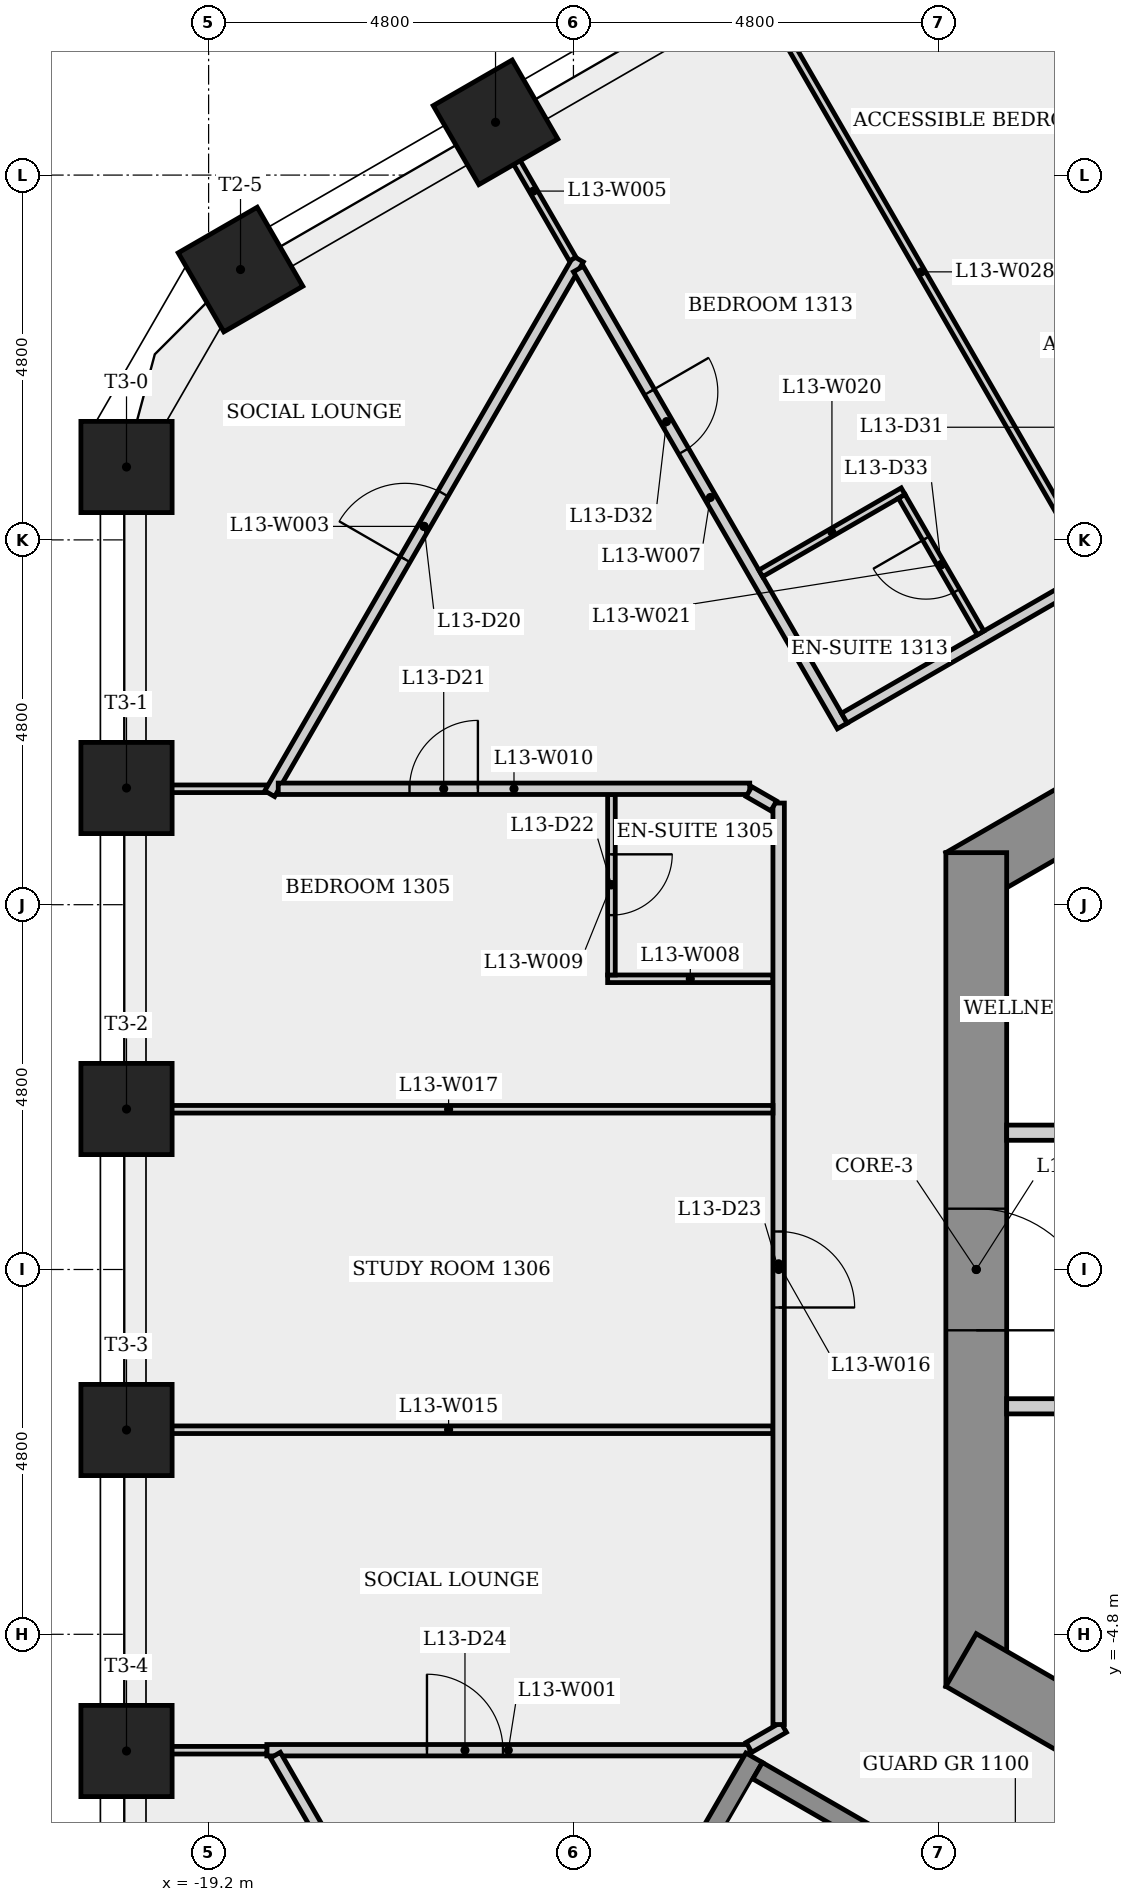
"""IFC4 building model, lengths in metres.
Left out: names, types, materials, properties, quantities, classifications, styles, units other than length and angle.
Written with IfcOpenShell. Run it as: python <this file> out.ifc"""

import sys

from ifc_helpers import new_model, si_unit, direction, frame, frame_2d, origin, origin_2d, place, context, subcontext, project, spatial, rectangle, extrude, element, fill, save


model = new_model("IFC4")
c1 = context("Model", 3, precision=1e-05, world=origin(), true_north=direction((0.0, 1.0)))
c2 = subcontext(c1, "Body", "Model", "MODEL_VIEW")
j1 = project(units=[si_unit("LENGTHUNIT", "METRE"), si_unit("PLANEANGLEUNIT", "RADIAN")], contexts=[c1])
p1 = place(None, origin())
s1 = spatial("IfcSite", under=j1, at=p1, CompositionType="ELEMENT")
p2 = place(p1, origin())
s2 = spatial("IfcBuilding", under=s1, at=p2, CompositionType="ELEMENT")
p3 = place(p2, frame((0.0, 0.0, 52.7)))
s3 = spatial("IfcBuildingStorey", under=s2, at=p3, CompositionType="ELEMENT", Elevation=52.7)
p4 = place(p3, frame((0.2, 10.623, 0.0), z_axis=(0.0, 0.0, 1.0), x_axis=(-0.866023993627, -0.500002442456, 0.0)))
e1 = element("IfcWall", 1, at=p4, inside=s3, PredefinedType="SHEAR", context=c2, shape_type="SweptSolid", body=[
    extrude(rectangle(XDim=10.97, YDim=0.8, at=frame_2d((5.485, 0.0))), origin(), (0.0, 0.0, 1.0), 3.4),
])
p5 = place(p4, frame((7.944, 0.0, 0.0)))
e2 = element("IfcOpeningElement", 2, at=p5, cuts=e1, PredefinedType="OPENING", context=c2, shape_type="SweptSolid", body=[
    extrude(rectangle(XDim=0.9, YDim=2.1, at=frame_2d((0.45, 1.05))), frame((0.0, 0.41, 0.0), z_axis=(0.0, -1.0, 0.0), x_axis=(1.0, 0.0, 0.0)), (0.0, 0.0, 1.0), 0.82),
])
p6 = place(p4, frame((1.86, 0.0, 0.0)))
e3 = element("IfcOpeningElement", 3, at=p6, cuts=e1, PredefinedType="OPENING", context=c2, shape_type="SweptSolid", body=[
    extrude(rectangle(XDim=0.9, YDim=2.1, at=frame_2d((0.45, 1.05))), frame((0.0, 0.41, 0.0), z_axis=(0.0, -1.0, 0.0), x_axis=(1.0, 0.0, 0.0)), (0.0, 0.0, 1.0), 0.82),
])
p7 = place(p3, frame((-9.1, 5.485, 0.0), z_axis=(0.0, 0.0, 1.0), x_axis=(0.0, -1.0, 0.0)))
e4 = element("IfcWall", 4, at=p7, inside=s3, PredefinedType="SHEAR", context=c2, shape_type="SweptSolid", body=[
    extrude(rectangle(XDim=10.97, YDim=0.8, at=frame_2d((5.485, 0.0))), origin(), (0.0, 0.0, 1.0), 3.4),
])
p8 = place(p7, frame((4.685, 0.0, 0.0)))
e5 = element("IfcOpeningElement", 5, at=p8, cuts=e4, PredefinedType="OPENING", context=c2, shape_type="SweptSolid", body=[
    extrude(rectangle(XDim=1.6, YDim=2.1, at=frame_2d((0.8, 1.05))), frame((0.0, 0.41, 0.0), z_axis=(0.0, -1.0, 0.0), x_axis=(1.0, 0.0, 0.0)), (0.0, 0.0, 1.0), 0.82),
])
p9 = place(p3, frame((-9.3, -5.138, 0.0), z_axis=(0.0, 0.0, 1.0), x_axis=(0.866023993627, -0.500002442456, 0.0)))
e6 = element("IfcWall", 6, at=p9, inside=s3, PredefinedType="SHEAR", context=c2, shape_type="SweptSolid", body=[
    extrude(rectangle(XDim=10.97, YDim=0.8, at=frame_2d((5.485, 0.0))), origin(), (0.0, 0.0, 1.0), 3.4),
])
p10 = place(p9, frame((5.74, 0.0, 0.0)))
e7 = element("IfcOpeningElement", 7, at=p10, cuts=e6, PredefinedType="OPENING", context=c2, shape_type="SweptSolid", body=[
    extrude(rectangle(XDim=0.9, YDim=2.1, at=frame_2d((0.45, 1.05))), frame((0.0, 0.41, 0.0), z_axis=(0.0, -1.0, 0.0), x_axis=(1.0, 0.0, 0.0)), (0.0, 0.0, 1.0), 0.82),
])
for number, where, z_axis, x_axis in (
    (8, (-15.425, 15.094, 0.0), (0.0, 0.0, 1.0), (-0.5, 0.866, 0.0)),
    (9, (-18.78, 13.157, 0.0), (0.0, 0.0, 1.0), (-0.5, 0.866, 0.0)),
    (10, (-20.28, 10.559, 0.0), (0.0, 0.0, 1.0), (-1.0, 0.0, 0.0)),
    (11, (-20.28, 6.335, 0.0), (0.0, 0.0, 1.0), (-1.0, 0.0, 0.0)),
    (12, (-20.28, 2.112, 0.0), (0.0, 0.0, 1.0), (-1.0, 0.0, 0.0)),
    (13, (-20.28, -2.112, 0.0), (0.0, 0.0, 1.0), (-1.0, 0.0, 0.0)),
    (14, (-20.28, -6.335, 0.0), (0.0, 0.0, 1.0), (-1.0, 0.0, 0.0)),
):
    element("IfcColumn", number, at=place(p3, frame(where, z_axis=z_axis, x_axis=x_axis)), inside=s3, PredefinedType="COLUMN", context=c2, shape_type="SweptSolid", body=[
        extrude(rectangle(XDim=1.2, YDim=1.2, at=origin_2d()), origin(), (0.0, 0.0, 1.0), 3.4),
    ])
p11 = place(p3, frame((-18.434, -6.325, 0.0), z_axis=(0.0, 0.0, 1.0), x_axis=(1.0, 0.0, 0.0)))
e15 = element("IfcWall", 15, at=p11, inside=s3, PredefinedType="PARTITIONING", context=c2, shape_type="SweptSolid", body=[
    extrude(rectangle(XDim=6.353, YDim=0.15, at=frame_2d((3.177, 0.0))), origin(), (0.0, 0.0, 1.0), 3.05),
])
p12 = place(p11, frame((2.107, 0.0, 0.0)))
e16 = element("IfcOpeningElement", 16, at=p12, cuts=e15, PredefinedType="OPENING", context=c2, shape_type="SweptSolid", body=[
    extrude(rectangle(XDim=1.0, YDim=2.1, at=frame_2d((0.5, 1.05))), frame((0.0, 0.085, 0.0), z_axis=(0.0, -1.0, 0.0), x_axis=(1.0, 0.0, 0.0)), (0.0, 0.0, 1.0), 0.17),
])
p13 = place(p3, frame((-18.434, 6.325, 0.0), z_axis=(0.0, 0.0, 1.0), x_axis=(-1.0, 0.0, 0.0)))
e17 = element("IfcWall", 17, at=p13, inside=s3, PredefinedType="PARTITIONING", context=c2, shape_type="SweptSolid", body=[
    extrude(rectangle(XDim=1.876, YDim=0.1, at=frame_2d((0.938, 0.0))), origin(), (0.0, 0.0, 1.0), 3.05),
])
p14 = place(p3, frame((-18.396, 6.26, 0.0), z_axis=(0.0, 0.0, 1.0), x_axis=(0.500005169787, 0.866022418986, 0.0)))
e18 = element("IfcWall", 18, at=p14, inside=s3, PredefinedType="PARTITIONING", context=c2, shape_type="SweptSolid", body=[
    extrude(rectangle(XDim=8.123, YDim=0.15, at=frame_2d((4.062, 0.0))), origin(), (0.0, 0.0, 1.0), 3.05),
])
p15 = place(p14, frame((3.561, 0.0, 0.0)))
e19 = element("IfcOpeningElement", 19, at=p15, cuts=e18, PredefinedType="OPENING", context=c2, shape_type="SweptSolid", body=[
    extrude(rectangle(XDim=1.0, YDim=2.1, at=frame_2d((0.5, 1.05))), frame((0.0, 0.085, 0.0), z_axis=(0.0, -1.0, 0.0), x_axis=(1.0, 0.0, 0.0)), (0.0, 0.0, 1.0), 0.17),
])
p16 = place(p3, frame((-18.434, -6.325, 0.0), z_axis=(0.0, 0.0, 1.0), x_axis=(-1.0, 0.0, 0.0)))
e20 = element("IfcWall", 20, at=p16, inside=s3, PredefinedType="PARTITIONING", context=c2, shape_type="SweptSolid", body=[
    extrude(rectangle(XDim=1.876, YDim=0.1, at=frame_2d((0.938, 0.0))), origin(), (0.0, 0.0, 1.0), 3.05),
])
p17 = place(p3, frame((-15.443, 15.084, 0.0), z_axis=(0.0, 0.0, 1.0), x_axis=(0.500015708345, -0.866016334377, 0.0)))
e21 = element("IfcWall", 21, at=p17, inside=s3, PredefinedType="PARTITIONING", context=c2, shape_type="SweptSolid", body=[
    extrude(rectangle(XDim=2.066, YDim=0.1, at=frame_2d((1.033, 0.0))), origin(), (0.0, 0.0, 1.0), 3.05),
])
p18 = place(p3, frame((-15.125, -11.927, 0.0), z_axis=(0.0, 0.0, 1.0), x_axis=(-0.499995720892, 0.866027874314, 0.0)))
e22 = element("IfcWall", 22, at=p18, inside=s3, PredefinedType="PARTITIONING", context=c2, shape_type="SweptSolid", body=[
    extrude(rectangle(XDim=6.393, YDim=0.15, at=frame_2d((3.197, 0.0))), origin(), (0.0, 0.0, 1.0), 3.05),
])
p19 = place(p18, frame((2.734, 0.0, 0.0)))
e23 = element("IfcOpeningElement", 23, at=p19, cuts=e22, PredefinedType="OPENING", context=c2, shape_type="SweptSolid", body=[
    extrude(rectangle(XDim=1.0, YDim=2.1, at=frame_2d((0.5, 1.05))), frame((0.0, 0.085, 0.0), z_axis=(0.0, -1.0, 0.0), x_axis=(1.0, 0.0, 0.0)), (0.0, 0.0, 1.0), 0.17),
])
p20 = place(p3, frame((-14.335, 13.165, 0.0), z_axis=(0.0, 0.0, 1.0), x_axis=(0.499981158809, -0.866036281478, 0.0)))
e24 = element("IfcWall", 24, at=p20, inside=s3, PredefinedType="PARTITIONING", context=c2, shape_type="SweptSolid", body=[
    extrude(rectangle(XDim=6.944, YDim=0.15, at=frame_2d((3.472, 0.0))), origin(), (0.0, 0.0, 1.0), 3.05),
])
p21 = place(p20, frame((1.869, 0.0, 0.0)))
e25 = element("IfcOpeningElement", 25, at=p21, cuts=e24, PredefinedType="OPENING", context=c2, shape_type="SweptSolid", body=[
    extrude(rectangle(XDim=0.9, YDim=2.1, at=frame_2d((0.45, 1.05))), frame((0.0, 0.085, 0.0), z_axis=(0.0, -1.0, 0.0), x_axis=(1.0, 0.0, 0.0)), (0.0, 0.0, 1.0), 0.17),
])
p22 = place(p3, frame((-13.95, 3.825, 0.0), z_axis=(0.0, 0.0, 1.0), x_axis=(1.0, 0.0, 0.0)))
e26 = element("IfcWall", 26, at=p22, inside=s3, PredefinedType="PARTITIONING", context=c2, shape_type="SweptSolid", body=[
    extrude(rectangle(XDim=2.175, YDim=0.1, at=frame_2d((1.087, 0.0))), origin(), (0.0, 0.0, 1.0), 3.05),
])
p23 = place(p3, frame((-13.9, 6.25, 0.0), z_axis=(0.0, 0.0, 1.0), x_axis=(0.0, -1.0, 0.0)))
e27 = element("IfcWall", 27, at=p23, inside=s3, PredefinedType="PARTITIONING", context=c2, shape_type="SweptSolid", body=[
    extrude(rectangle(XDim=2.375, YDim=0.1, at=frame_2d((1.188, 0.0))), origin(), (0.0, 0.0, 1.0), 3.05),
])
p24 = place(p23, frame((0.788, 0.0, 0.0)))
e28 = element("IfcOpeningElement", 28, at=p24, cuts=e27, PredefinedType="OPENING", context=c2, shape_type="SweptSolid", body=[
    extrude(rectangle(XDim=0.8, YDim=2.1, at=frame_2d((0.4, 1.05))), frame((0.0, 0.06, 0.0), z_axis=(0.0, -1.0, 0.0), x_axis=(1.0, 0.0, 0.0)), (0.0, 0.0, 1.0), 0.12),
])
p25 = place(p3, frame((-18.284, 6.325, 0.0), z_axis=(0.0, 0.0, 1.0), x_axis=(1.0, 0.0, 0.0)))
e29 = element("IfcWall", 29, at=p25, inside=s3, PredefinedType="PARTITIONING", context=c2, shape_type="SweptSolid", body=[
    extrude(rectangle(XDim=6.203, YDim=0.15, at=frame_2d((3.102, 0.0))), origin(), (0.0, 0.0, 1.0), 3.05),
])
p26 = place(p25, frame((1.727, 0.0, 0.0)))
e30 = element("IfcOpeningElement", 30, at=p26, cuts=e29, PredefinedType="OPENING", context=c2, shape_type="SweptSolid", body=[
    extrude(rectangle(XDim=0.9, YDim=2.1, at=frame_2d((0.45, 1.05))), frame((0.0, 0.085, 0.0), z_axis=(0.0, -1.0, 0.0), x_axis=(1.0, 0.0, 0.0)), (0.0, 0.0, 1.0), 0.17),
])
p27 = place(p3, frame((-13.648, -9.239, 0.0), z_axis=(0.0, 0.0, 1.0), x_axis=(0.500017246033, 0.866015446554, 0.0)))
e31 = element("IfcWall", 31, at=p27, inside=s3, PredefinedType="SHEAR", context=c2, shape_type="SweptSolid", body=[
    extrude(rectangle(XDim=3.25, YDim=0.25, at=frame_2d((1.625, 0.0))), origin(), (0.0, 0.0, 1.0), 3.05),
])
p28 = place(p3, frame((-12.091, -6.288, 0.0), z_axis=(0.0, 0.0, 1.0), x_axis=(0.866208757248, 0.499682287925, 0.0)))
e32 = element("IfcWall", 32, at=p28, inside=s3, PredefinedType="PARTITIONING", context=c2, shape_type="SweptSolid", body=[
    extrude(rectangle(XDim=0.526, YDim=0.15, at=frame_2d((0.263, 0.0))), origin(), (0.0, 0.0, 1.0), 3.05),
])
p29 = place(p3, frame((-11.977, -6.595, 0.0), z_axis=(0.0, 0.0, 1.0), x_axis=(0.866025499775, -0.499999833739, 0.0)))
e33 = element("IfcWall", 33, at=p29, inside=s3, PredefinedType="SHEAR", context=c2, shape_type="SweptSolid", body=[
    extrude(rectangle(XDim=6.4, YDim=0.25, at=frame_2d((3.2, 0.0))), origin(), (0.0, 0.0, 1.0), 3.05),
])
p30 = place(p29, frame((5.025, 0.0, 0.0)))
e34 = element("IfcOpeningElement", 34, at=p30, cuts=e33, PredefinedType="OPENING", context=c2, shape_type="SweptSolid", body=[
    extrude(rectangle(XDim=1.0, YDim=2.1, at=frame_2d((0.5, 1.05))), frame((0.0, 0.135, 0.0), z_axis=(0.0, -1.0, 0.0), x_axis=(1.0, 0.0, 0.0)), (0.0, 0.0, 1.0), 0.27),
])
p31 = place(p3, frame((-11.775, -2.108, 0.0), z_axis=(0.0, 0.0, 1.0), x_axis=(-1.0, 0.0, 0.0)))
e35 = element("IfcWall", 35, at=p31, inside=s3, PredefinedType="PARTITIONING", context=c2, shape_type="SweptSolid", body=[
    extrude(rectangle(XDim=8.535, YDim=0.1, at=frame_2d((4.268, 0.0))), origin(), (0.0, 0.0, 1.0), 3.05),
])
p32 = place(p3, frame((-11.7, 6.137, 0.0), z_axis=(0.0, 0.0, 1.0), x_axis=(0.0, -1.0, 0.0)))
e36 = element("IfcWall", 36, at=p32, inside=s3, PredefinedType="PARTITIONING", context=c2, shape_type="SweptSolid", body=[
    extrude(rectangle(XDim=12.125, YDim=0.15, at=frame_2d((6.062, 0.0))), origin(), (0.0, 0.0, 1.0), 3.05),
])
p33 = place(p32, frame((5.637, 0.0, 0.0)))
e37 = element("IfcOpeningElement", 37, at=p33, cuts=e36, PredefinedType="OPENING", context=c2, shape_type="SweptSolid", body=[
    extrude(rectangle(XDim=1.0, YDim=2.1, at=frame_2d((0.5, 1.05))), frame((0.0, 0.085, 0.0), z_axis=(0.0, -1.0, 0.0), x_axis=(1.0, 0.0, 0.0)), (0.0, 0.0, 1.0), 0.17),
])
p34 = place(p3, frame((-11.775, 2.108, 0.0), z_axis=(0.0, 0.0, 1.0), x_axis=(-1.0, 0.0, 0.0)))
e38 = element("IfcWall", 38, at=p34, inside=s3, PredefinedType="PARTITIONING", context=c2, shape_type="SweptSolid", body=[
    extrude(rectangle(XDim=8.535, YDim=0.1, at=frame_2d((4.268, 0.0))), origin(), (0.0, 0.0, 1.0), 3.05),
])
p35 = place(p3, frame((-11.765, 6.1, 0.0), z_axis=(0.0, 0.0, 1.0), x_axis=(-0.866239593359, 0.499628829129, 0.0)))
e39 = element("IfcWall", 39, at=p35, inside=s3, PredefinedType="PARTITIONING", context=c2, shape_type="SweptSolid", body=[
    extrude(rectangle(XDim=0.376, YDim=0.15, at=frame_2d((0.188, 0.0))), origin(), (0.0, 0.0, 1.0), 3.05),
])
p36 = place(p3, frame((-10.836, 7.254, 0.0), z_axis=(0.0, 0.0, 1.0), x_axis=(0.866028032582, 0.499995446761, 0.0)))
e40 = element("IfcWall", 40, at=p36, inside=s3, PredefinedType="PARTITIONING", context=c2, shape_type="SweptSolid", body=[
    extrude(rectangle(XDim=11.664, YDim=0.15, at=frame_2d((5.832, 0.0))), origin(), (0.0, 0.0, 1.0), 3.05),
])
p37 = place(p36, frame((4.213, 0.0, 0.0)))
e41 = element("IfcOpeningElement", 41, at=p37, cuts=e40, PredefinedType="OPENING", context=c2, shape_type="SweptSolid", body=[
    extrude(rectangle(XDim=0.9, YDim=2.1, at=frame_2d((0.45, 1.05))), frame((0.0, 0.085, 0.0), z_axis=(0.0, -1.0, 0.0), x_axis=(1.0, 0.0, 0.0)), (0.0, 0.0, 1.0), 0.17),
])
p38 = place(p3, frame((-10.062, 10.241, 0.0), z_axis=(0.0, 0.0, 1.0), x_axis=(-0.865997604128, -0.500048147326, 0.0)))
e42 = element("IfcWall", 42, at=p38, inside=s3, PredefinedType="PARTITIONING", context=c2, shape_type="SweptSolid", body=[
    extrude(rectangle(XDim=2.163, YDim=0.1, at=frame_2d((1.082, 0.0))), origin(), (0.0, 0.0, 1.0), 3.05),
])
p39 = place(p3, frame((-9.043, 8.375, 0.0), z_axis=(0.0, 0.0, 1.0), x_axis=(-0.500011000363, 0.866019052629, 0.0)))
e43 = element("IfcWall", 43, at=p39, inside=s3, PredefinedType="PARTITIONING", context=c2, shape_type="SweptSolid", body=[
    extrude(rectangle(XDim=2.075, YDim=0.1, at=frame_2d((1.038, 0.0))), origin(), (0.0, 0.0, 1.0), 3.05),
])
p40 = place(p39, frame((0.637, 0.0, 0.0)))
e44 = element("IfcOpeningElement", 44, at=p40, cuts=e43, PredefinedType="OPENING", context=c2, shape_type="SweptSolid", body=[
    extrude(rectangle(XDim=0.8, YDim=2.1, at=frame_2d((0.4, 1.05))), frame((0.0, 0.06, 0.0), z_axis=(0.0, -1.0, 0.0), x_axis=(1.0, 0.0, 0.0)), (0.0, 0.0, 1.0), 0.12),
])
p41 = place(p3, frame((-8.7, 1.8, 0.0), z_axis=(0.0, 0.0, 1.0), x_axis=(1.0, 0.0, 0.0)))
e45 = element("IfcWall", 45, at=p41, inside=s3, PredefinedType="PARTITIONING", context=c2, shape_type="SweptSolid", body=[
    extrude(rectangle(XDim=1.225, YDim=0.2, at=frame_2d((0.613, 0.0))), origin(), (0.0, 0.0, 1.0), 3.05),
])
p42 = place(p3, frame((-7.571, 9.226, 0.0), z_axis=(0.0, 0.0, 1.0), x_axis=(-0.499989081013, 0.866031707772, 0.0)))
e46 = element("IfcWall", 46, at=p42, inside=s3, PredefinedType="PARTITIONING", context=c2, shape_type="SweptSolid", body=[
    extrude(rectangle(XDim=9.01, YDim=0.1, at=frame_2d((4.505, 0.0))), origin(), (0.0, 0.0, 1.0), 3.05),
])
p43 = place(p3, frame((-7.475, -1.8, 0.0), z_axis=(0.0, 0.0, 1.0), x_axis=(-1.0, 0.0, 0.0)))
e47 = element("IfcWall", 47, at=p43, inside=s3, PredefinedType="PARTITIONING", context=c2, shape_type="SweptSolid", body=[
    extrude(rectangle(XDim=1.225, YDim=0.2, at=frame_2d((0.613, 0.0))), origin(), (0.0, 0.0, 1.0), 3.05),
])
p44 = place(p3, frame((-8.709, 18.972, 0.0), z_axis=(0.0, 0.0, 1.0), x_axis=(0.499989081013, -0.866031707772, 0.0)))
e48 = element("IfcWall", 48, at=p44, inside=s3, PredefinedType="PARTITIONING", context=c2, shape_type="SweptSolid", body=[
    extrude(rectangle(XDim=9.01, YDim=0.1, at=frame_2d((4.505, 0.0))), origin(), (0.0, 0.0, 1.0), 3.05),
])
p45 = place(p15, origin())
e49 = element("IfcDoor", 49, at=p45, inside=s3, OperationType="SINGLE_SWING_LEFT", PredefinedType="DOOR", context=c2, shape_type="SweptSolid", body=[
    extrude(rectangle(XDim=1.0, YDim=2.1, at=frame_2d((0.5, 1.05))), frame((0.0, 0.025, 0.0), z_axis=(0.0, -1.0, 0.0), x_axis=(1.0, 0.0, 0.0)), (0.0, 0.0, 1.0), 0.05),
])
fill(e19, e49)
p46 = place(p26, origin())
e50 = element("IfcDoor", 50, at=p46, inside=s3, OperationType="SINGLE_SWING_RIGHT", PredefinedType="DOOR", context=c2, shape_type="SweptSolid", body=[
    extrude(rectangle(XDim=0.9, YDim=2.1, at=frame_2d((0.45, 1.05))), frame((0.0, 0.025, 0.0), z_axis=(0.0, -1.0, 0.0), x_axis=(1.0, 0.0, 0.0)), (0.0, 0.0, 1.0), 0.05),
])
fill(e30, e50)
p47 = place(p24, origin())
e51 = element("IfcDoor", 51, at=p47, inside=s3, OperationType="SINGLE_SWING_LEFT", PredefinedType="DOOR", context=c2, shape_type="SweptSolid", body=[
    extrude(rectangle(XDim=0.8, YDim=2.1, at=frame_2d((0.4, 1.05))), frame((0.0, 0.025, 0.0), z_axis=(0.0, -1.0, 0.0), x_axis=(1.0, 0.0, 0.0)), (0.0, 0.0, 1.0), 0.05),
])
fill(e28, e51)
p48 = place(p33, origin())
e52 = element("IfcDoor", 52, at=p48, inside=s3, OperationType="SINGLE_SWING_RIGHT", PredefinedType="DOOR", context=c2, shape_type="SweptSolid", body=[
    extrude(rectangle(XDim=1.0, YDim=2.1, at=frame_2d((0.5, 1.05))), frame((0.0, 0.025, 0.0), z_axis=(0.0, -1.0, 0.0), x_axis=(1.0, 0.0, 0.0)), (0.0, 0.0, 1.0), 0.05),
])
fill(e37, e52)
p49 = place(p12, origin())
e53 = element("IfcDoor", 53, at=p49, inside=s3, OperationType="SINGLE_SWING_LEFT", PredefinedType="DOOR", context=c2, shape_type="SweptSolid", body=[
    extrude(rectangle(XDim=1.0, YDim=2.1, at=frame_2d((0.5, 1.05))), frame((0.0, 0.025, 0.0), z_axis=(0.0, -1.0, 0.0), x_axis=(1.0, 0.0, 0.0)), (0.0, 0.0, 1.0), 0.05),
])
fill(e16, e53)
p50 = place(p21, origin())
e54 = element("IfcDoor", 54, at=p50, inside=s3, OperationType="SINGLE_SWING_LEFT", PredefinedType="DOOR", context=c2, shape_type="SweptSolid", body=[
    extrude(rectangle(XDim=0.9, YDim=2.1, at=frame_2d((0.45, 1.05))), frame((0.0, 0.025, 0.0), z_axis=(0.0, -1.0, 0.0), x_axis=(1.0, 0.0, 0.0)), (0.0, 0.0, 1.0), 0.05),
])
fill(e25, e54)
p51 = place(p40, origin())
e55 = element("IfcDoor", 55, at=p51, inside=s3, OperationType="SINGLE_SWING_RIGHT", PredefinedType="DOOR", context=c2, shape_type="SweptSolid", body=[
    extrude(rectangle(XDim=0.8, YDim=2.1, at=frame_2d((0.4, 1.05))), frame((0.0, 0.025, 0.0), z_axis=(0.0, -1.0, 0.0), x_axis=(1.0, 0.0, 0.0)), (0.0, 0.0, 1.0), 0.05),
])
fill(e44, e55)
p52 = place(p8, origin())
e56 = element("IfcDoor", 56, at=p52, inside=s3, OperationType="SINGLE_SWING_RIGHT", PredefinedType="DOOR", context=c2, shape_type="SweptSolid", body=[
    extrude(rectangle(XDim=1.6, YDim=2.1, at=frame_2d((0.8, 1.05))), frame((0.0, 0.025, 0.0), z_axis=(0.0, -1.0, 0.0), x_axis=(1.0, 0.0, 0.0)), (0.0, 0.0, 1.0), 0.05),
])
fill(e5, e56)
save(model, sys.argv[1])
